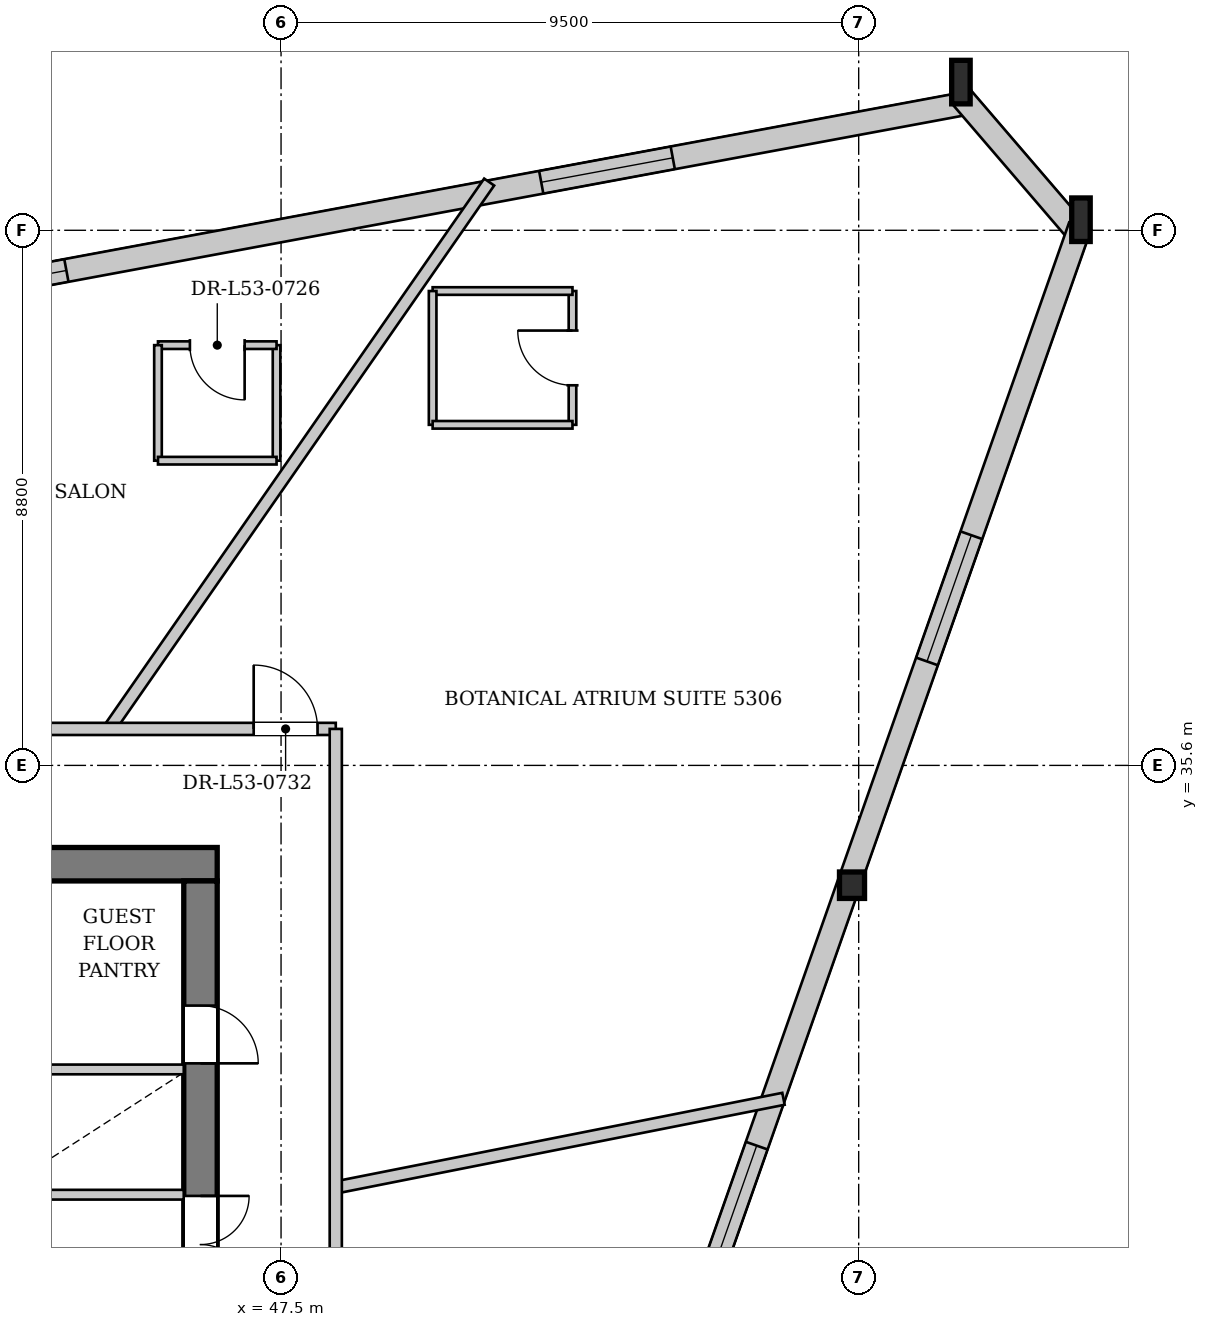
"""IFC4 building model, lengths in metres.
Left out: names, types, materials, properties, quantities, classifications, styles, units other than length and angle.
Written with IfcOpenShell. Run it as: python <this file> out.ifc"""

import sys

from ifc_helpers import new_model, si_unit, direction, frame, frame_2d, origin, origin_2d, place, context, subcontext, project, spatial, rectangle, i_section, extrude, source, transform, mapped, element, fill, save


model = new_model("IFC4")
c1 = context("Model", 3, precision=1e-05, world=origin(), true_north=direction((0.0, 1.0)))
c2 = subcontext(c1, "Body", "Model", "MODEL_VIEW")
j1 = project(units=[si_unit("LENGTHUNIT", "METRE"), si_unit("PLANEANGLEUNIT", "RADIAN")], contexts=[c1])
p1 = place(None, origin())
s1 = spatial("IfcSite", under=j1, at=p1, CompositionType="ELEMENT")
p2 = place(p1, origin())
s2 = spatial("IfcBuilding", under=s1, at=p2, CompositionType="ELEMENT")
p3 = place(p2, frame((0.0, 0.0, 200.3)))
s3 = spatial("IfcBuildingStorey", under=s2, at=p3, CompositionType="ELEMENT", Elevation=200.3)
m1 = source(origin(), c2, "Body", "SweptSolid", [
    extrude(i_section(OverallWidth=0.304, OverallDepth=0.716, WebThickness=0.021, FlangeThickness=0.04, at=origin_2d()), origin(), (0.0, 0.0, 1.0), 3.864),
])
p4 = place(p3, frame((60.82, 44.403, 0.0), z_axis=(-0.084855028505, 0.088203737746, 0.992481599217), x_axis=(-0.720654483977, -0.693294392537, 0.0)))
e1 = element("IfcColumn", 1, at=p4, inside=s3, PredefinedType="COLUMN", context=c2, shape_type="MappedRepresentation", body=[
    mapped(m1, transform((0.0, 0.0, 0.0), x_axis=(1.0, 0.0, 0.0), y_axis=(0.0, 1.0, 0.0), z_axis=(0.0, 0.0, 1.0), scale=1.0)),
])
m2 = source(origin(), c2, "Body", "SweptSolid", [
    extrude(i_section(OverallWidth=0.304, OverallDepth=0.716, WebThickness=0.021, FlangeThickness=0.04, at=origin_2d()), origin(), (0.0, 0.0, 1.0), 3.86),
])
p5 = place(p3, frame((58.851, 46.697, 0.0), z_axis=(-0.08766060525, 0.072797515616, 0.993486859504), x_axis=(-0.638873164719, -0.769312081929, 0.0)))
e2 = element("IfcColumn", 2, at=p5, inside=s3, PredefinedType="COLUMN", context=c2, shape_type="MappedRepresentation", body=[
    mapped(m2, transform((0.0, 0.0, 0.0), x_axis=(1.0, 0.0, 0.0), y_axis=(0.0, 1.0, 0.0), z_axis=(0.0, 0.0, 1.0), scale=1.0)),
])
m3 = source(origin(), c2, "Body", "SweptSolid", [
    extrude(i_section(OverallWidth=0.412, OverallDepth=0.435, WebThickness=0.031, FlangeThickness=0.05, at=origin_2d()), origin(), (0.0, 0.0, 1.0), 3.851),
])
p6 = place(p3, frame((56.977, 33.478, 0.0), z_axis=(-0.045076189594, 0.078930880513, 0.995860458716), x_axis=(-0.868371879797, -0.495913579546, 0.0)))
e3 = element("IfcColumn", 3, at=p6, inside=s3, PredefinedType="COLUMN", context=c2, shape_type="MappedRepresentation", body=[
    mapped(m3, transform((0.0, 0.0, 0.0), x_axis=(1.0, 0.0, 0.0), y_axis=(0.0, 1.0, 0.0), z_axis=(0.0, 0.0, 1.0), scale=1.0)),
])
p7 = place(p3, frame((36.667, 42.383, 0.0), z_axis=(0.0, 0.0, 1.0), x_axis=(0.983180478303, 0.182636653177, 0.0)))
e4 = element("IfcWall", 4, at=p7, inside=s3, PredefinedType="SOLIDWALL", context=c2, shape_type="SweptSolid", body=[
    extrude(rectangle(XDim=22.598, YDim=0.38, at=frame_2d((11.299, 0.0))), origin(), (0.0, 0.0, 1.0), 2.972),
])
p8 = place(p7, frame((5.227, 0.0, 0.602)))
e5 = element("IfcOpeningElement", 5, at=p8, cuts=e4, PredefinedType="OPENING", context=c2, shape_type="SweptSolid", body=[
    extrude(rectangle(XDim=2.2, YDim=2.25, at=frame_2d((1.1, 1.125))), frame((0.0, 0.2, 0.0), z_axis=(0.0, -1.0, 0.0), x_axis=(1.0, 0.0, 0.0)), (0.0, 0.0, 1.0), 0.4),
])
p9 = place(p7, frame((15.37, 0.0, 0.602)))
e6 = element("IfcOpeningElement", 6, at=p9, cuts=e4, PredefinedType="OPENING", context=c2, shape_type="SweptSolid", body=[
    extrude(rectangle(XDim=2.2, YDim=2.25, at=frame_2d((1.1, 1.125))), frame((0.0, 0.2, 0.0), z_axis=(0.0, -1.0, 0.0), x_axis=(1.0, 0.0, 0.0)), (0.0, 0.0, 1.0), 0.4),
])
p10 = place(p3, frame((58.706, 46.573, 0.0), z_axis=(0.0, 0.0, 1.0), x_axis=(0.651396453901, -0.758737543453, 0.0)))
e7 = element("IfcWall", 7, at=p10, inside=s3, PredefinedType="SOLIDWALL", context=c2, shape_type="SweptSolid", body=[
    extrude(rectangle(XDim=3.023, YDim=0.38, at=frame_2d((1.511, 0.0))), origin(), (0.0, 0.0, 1.0), 2.972),
])
p11 = place(p3, frame((60.64, 44.466, 0.0), z_axis=(0.0, 0.0, 1.0), x_axis=(-0.331792792619, -0.94335228985, 0.0)))
e8 = element("IfcWall", 8, at=p11, inside=s3, PredefinedType="SOLIDWALL", context=c2, shape_type="SweptSolid", body=[
    extrude(rectangle(XDim=23.163, YDim=0.38, at=frame_2d((11.582, 0.0))), origin(), (0.0, 0.0, 1.0), 2.972),
])
p12 = place(p11, frame((5.386, 0.0, 0.602)))
e9 = element("IfcOpeningElement", 9, at=p12, cuts=e8, PredefinedType="OPENING", context=c2, shape_type="SweptSolid", body=[
    extrude(rectangle(XDim=2.2, YDim=2.25, at=frame_2d((1.1, 1.125))), frame((0.0, 0.2, 0.0), z_axis=(0.0, -1.0, 0.0), x_axis=(1.0, 0.0, 0.0)), (0.0, 0.0, 1.0), 0.4),
])
p13 = place(p11, frame((16.027, 0.0, 0.602)))
e10 = element("IfcOpeningElement", 10, at=p13, cuts=e8, PredefinedType="OPENING", context=c2, shape_type="SweptSolid", body=[
    extrude(rectangle(XDim=2.2, YDim=2.25, at=frame_2d((1.1, 1.125))), frame((0.0, 0.2, 0.0), z_axis=(0.0, -1.0, 0.0), x_axis=(1.0, 0.0, 0.0)), (0.0, 0.0, 1.0), 0.4),
])
p14 = place(p3, frame((29.55, 33.975, 0.0), z_axis=(0.0, 0.0, 1.0), x_axis=(1.0, 0.0, 0.0)))
e11 = element("IfcWall", 11, at=p14, inside=s3, PredefinedType="SHEAR", context=c2, shape_type="SweptSolid", body=[
    extrude(rectangle(XDim=16.9, YDim=0.55, at=frame_2d((8.45, 0.0))), origin(), (0.0, 0.0, 1.0), 3.58),
])
p15 = place(p14, frame((1.55, 0.0, 0.0)))
e12 = element("IfcOpeningElement", 12, at=p15, cuts=e11, PredefinedType="OPENING", context=c2, shape_type="SweptSolid", body=[
    extrude(rectangle(XDim=0.95, YDim=2.1, at=frame_2d((0.475, 1.05))), frame((0.0, 0.285, 0.0), z_axis=(0.0, -1.0, 0.0), x_axis=(1.0, 0.0, 0.0)), (0.0, 0.0, 1.0), 0.57),
])
p16 = place(p14, frame((3.93, 0.0, 0.0)))
e13 = element("IfcOpeningElement", 13, at=p16, cuts=e11, PredefinedType="OPENING", context=c2, shape_type="SweptSolid", body=[
    extrude(rectangle(XDim=1.32, YDim=2.2, at=frame_2d((0.66, 1.1))), frame((0.0, 0.285, 0.0), z_axis=(0.0, -1.0, 0.0), x_axis=(1.0, 0.0, 0.0)), (0.0, 0.0, 1.0), 0.57),
])
p17 = place(p3, frame((46.175, 33.7, 0.0), z_axis=(0.0, 0.0, 1.0), x_axis=(0.0, -1.0, 0.0)))
e14 = element("IfcWall", 14, at=p17, inside=s3, PredefinedType="SHEAR", context=c2, shape_type="SweptSolid", body=[
    extrude(rectangle(XDim=14.2, YDim=0.55, at=frame_2d((7.1, 0.0))), origin(), (0.0, 0.0, 1.0), 3.58),
])
p18 = place(p17, frame((5.18, 0.0, 0.0)))
e15 = element("IfcOpeningElement", 15, at=p18, cuts=e14, PredefinedType="OPENING", context=c2, shape_type="SweptSolid", body=[
    extrude(rectangle(XDim=1.6, YDim=2.2, at=frame_2d((0.8, 1.1))), frame((0.0, 0.285, 0.0), z_axis=(0.0, -1.0, 0.0), x_axis=(1.0, 0.0, 0.0)), (0.0, 0.0, 1.0), 0.57),
])
p19 = place(p17, frame((2.05, 0.0, 0.0)))
e16 = element("IfcOpeningElement", 16, at=p19, cuts=e14, PredefinedType="OPENING", context=c2, shape_type="SweptSolid", body=[
    extrude(rectangle(XDim=0.95, YDim=2.1, at=frame_2d((0.475, 1.05))), frame((0.0, 0.285, 0.0), z_axis=(0.0, -1.0, 0.0), x_axis=(1.0, 0.0, 0.0)), (0.0, 0.0, 1.0), 0.57),
])
p20 = place(p3, frame((33.28, 28.54, 0.0), z_axis=(0.0, 0.0, 1.0), x_axis=(1.0, 0.0, 0.0)))
e17 = element("IfcWall", 17, at=p20, inside=s3, PredefinedType="PARTITIONING", context=c2, shape_type="SweptSolid", body=[
    extrude(rectangle(XDim=12.62, YDim=0.16, at=frame_2d((6.31, 0.0))), origin(), (0.0, 0.0, 1.0), 3.58),
])
p21 = place(p20, frame((0.26, 0.0, 0.0)))
e18 = element("IfcOpeningElement", 18, at=p21, cuts=e17, PredefinedType="OPENING", context=c2, shape_type="SweptSolid", body=[
    extrude(rectangle(XDim=1.1, YDim=2.2, at=frame_2d((0.55, 1.1))), frame((0.0, 0.09, 0.0), z_axis=(0.0, -1.0, 0.0), x_axis=(1.0, 0.0, 0.0)), (0.0, 0.0, 1.0), 0.18),
])
p22 = place(p20, frame((2.01, 0.0, 0.0)))
e19 = element("IfcOpeningElement", 19, at=p22, cuts=e17, PredefinedType="OPENING", context=c2, shape_type="SweptSolid", body=[
    extrude(rectangle(XDim=1.1, YDim=2.2, at=frame_2d((0.55, 1.1))), frame((0.0, 0.09, 0.0), z_axis=(0.0, -1.0, 0.0), x_axis=(1.0, 0.0, 0.0)), (0.0, 0.0, 1.0), 0.18),
])
p23 = place(p20, frame((3.76, 0.0, 0.0)))
e20 = element("IfcOpeningElement", 20, at=p23, cuts=e17, PredefinedType="OPENING", context=c2, shape_type="SweptSolid", body=[
    extrude(rectangle(XDim=1.1, YDim=2.2, at=frame_2d((0.55, 1.1))), frame((0.0, 0.09, 0.0), z_axis=(0.0, -1.0, 0.0), x_axis=(1.0, 0.0, 0.0)), (0.0, 0.0, 1.0), 0.18),
])
p24 = place(p3, frame((40.72, 30.6, 0.0), z_axis=(0.0, 0.0, 1.0), x_axis=(1.0, 0.0, 0.0)))
e21 = element("IfcWall", 21, at=p24, inside=s3, PredefinedType="PARTITIONING", context=c2, shape_type="SweptSolid", body=[
    extrude(rectangle(XDim=5.18, YDim=0.16, at=frame_2d((2.59, 0.0))), origin(), (0.0, 0.0, 1.0), 3.58),
])
p25 = place(p3, frame((48.4, 28.659, 0.0), z_axis=(0.0, 0.0, 1.0), x_axis=(0.980954168832, 0.19423933343, 0.0)))
e22 = element("IfcWall", 22, at=p25, inside=s3, PredefinedType="PARTITIONING", context=c2, shape_type="SweptSolid", body=[
    extrude(rectangle(XDim=7.506, YDim=0.2, at=frame_2d((3.753, 0.0))), origin(), (0.0, 0.0, 1.0), 3.58),
])
p26 = place(p3, frame((44.672, 36.2, 0.0), z_axis=(0.0, 0.0, 1.0), x_axis=(0.570707826582, 0.821153199274, 0.0)))
e23 = element("IfcWall", 23, at=p26, inside=s3, PredefinedType="PARTITIONING", context=c2, shape_type="SweptSolid", body=[
    extrude(rectangle(XDim=10.952, YDim=0.2, at=frame_2d((5.476, 0.0))), origin(), (0.0, 0.0, 1.0), 3.58),
])
p27 = place(p3, frame((52.293, 41.201, 0.0), z_axis=(0.0, 0.0, 1.0), x_axis=(0.0, 1.0, 0.0)))
e24 = element("IfcWall", 24, at=p27, inside=s3, PredefinedType="PARTITIONING", context=c2, shape_type="SweptSolid", body=[
    extrude(rectangle(XDim=2.2, YDim=0.125, at=frame_2d((1.1, 0.0))), origin(), (0.0, 0.0, 1.0), 3.58),
])
p28 = place(p27, frame((0.65, 0.0, 0.0)))
e25 = element("IfcOpeningElement", 25, at=p28, cuts=e24, PredefinedType="OPENING", context=c2, shape_type="SweptSolid", body=[
    extrude(rectangle(XDim=0.9, YDim=2.1, at=frame_2d((0.45, 1.05))), frame((0.0, 0.073, 0.0), z_axis=(0.0, -1.0, 0.0), x_axis=(1.0, 0.0, 0.0)), (0.0, 0.0, 1.0), 0.145),
])
p29 = place(p3, frame((52.293, 43.401, 0.0), z_axis=(0.0, 0.0, 1.0), x_axis=(-1.0, 0.0, 0.0)))
e26 = element("IfcWall", 26, at=p29, inside=s3, PredefinedType="PARTITIONING", context=c2, shape_type="SweptSolid", body=[
    extrude(rectangle(XDim=2.3, YDim=0.125, at=frame_2d((1.15, 0.0))), origin(), (0.0, 0.0, 1.0), 3.58),
])
p30 = place(p3, frame((49.993, 43.401, 0.0), z_axis=(0.0, 0.0, 1.0), x_axis=(0.0, -1.0, 0.0)))
e27 = element("IfcWall", 27, at=p30, inside=s3, PredefinedType="PARTITIONING", context=c2, shape_type="SweptSolid", body=[
    extrude(rectangle(XDim=2.2, YDim=0.125, at=frame_2d((1.1, 0.0))), origin(), (0.0, 0.0, 1.0), 3.58),
])
p31 = place(p3, frame((49.993, 41.201, 0.0), z_axis=(0.0, 0.0, 1.0), x_axis=(1.0, 0.0, 0.0)))
e28 = element("IfcWall", 28, at=p31, inside=s3, PredefinedType="PARTITIONING", context=c2, shape_type="SweptSolid", body=[
    extrude(rectangle(XDim=2.3, YDim=0.125, at=frame_2d((1.15, 0.0))), origin(), (0.0, 0.0, 1.0), 3.325),
])
p32 = place(p3, frame((47.426, 40.611, 0.0), z_axis=(0.0, 0.0, 1.0), x_axis=(0.0, 1.0, 0.0)))
e29 = element("IfcWall", 29, at=p32, inside=s3, PredefinedType="PARTITIONING", context=c2, shape_type="SweptSolid", body=[
    extrude(rectangle(XDim=1.9, YDim=0.125, at=frame_2d((0.95, 0.0))), origin(), (0.0, 0.0, 1.0), 3.58),
])
p33 = place(p3, frame((47.426, 42.511, 0.0), z_axis=(0.0, 0.0, 1.0), x_axis=(-1.0, 0.0, 0.0)))
e30 = element("IfcWall", 30, at=p33, inside=s3, PredefinedType="PARTITIONING", context=c2, shape_type="SweptSolid", body=[
    extrude(rectangle(XDim=1.95, YDim=0.125, at=frame_2d((0.975, 0.0))), origin(), (0.0, 0.0, 1.0), 3.58),
])
p34 = place(p33, frame((0.525, 0.0, 0.0)))
e31 = element("IfcOpeningElement", 31, at=p34, cuts=e30, PredefinedType="OPENING", context=c2, shape_type="SweptSolid", body=[
    extrude(rectangle(XDim=0.9, YDim=2.1, at=frame_2d((0.45, 1.05))), frame((0.0, 0.073, 0.0), z_axis=(0.0, -1.0, 0.0), x_axis=(1.0, 0.0, 0.0)), (0.0, 0.0, 1.0), 0.145),
])
p35 = place(p3, frame((45.476, 42.511, 0.0), z_axis=(0.0, 0.0, 1.0), x_axis=(0.0, -1.0, 0.0)))
e32 = element("IfcWall", 32, at=p35, inside=s3, PredefinedType="PARTITIONING", context=c2, shape_type="SweptSolid", body=[
    extrude(rectangle(XDim=1.9, YDim=0.125, at=frame_2d((0.95, 0.0))), origin(), (0.0, 0.0, 1.0), 3.58),
])
p36 = place(p3, frame((45.476, 40.611, 0.0), z_axis=(0.0, 0.0, 1.0), x_axis=(1.0, 0.0, 0.0)))
e33 = element("IfcWall", 33, at=p36, inside=s3, PredefinedType="PARTITIONING", context=c2, shape_type="SweptSolid", body=[
    extrude(rectangle(XDim=1.95, YDim=0.125, at=frame_2d((0.975, 0.0))), origin(), (0.0, 0.0, 1.0), 3.325),
])
p37 = place(p3, frame((43.4, 36.2, 0.0), z_axis=(0.0, 0.0, 1.0), x_axis=(1.0, 0.0, 0.0)))
e34 = element("IfcWall", 34, at=p37, inside=s3, PredefinedType="PARTITIONING", context=c2, shape_type="SweptSolid", body=[
    extrude(rectangle(XDim=5.0, YDim=0.2, at=frame_2d((2.5, 0.0))), origin(), (0.0, 0.0, 1.0), 3.58),
])
p38 = place(p37, frame((3.65, 0.0, 0.0)))
e35 = element("IfcOpeningElement", 35, at=p38, cuts=e34, PredefinedType="OPENING", context=c2, shape_type="SweptSolid", body=[
    extrude(rectangle(XDim=1.05, YDim=2.2, at=frame_2d((0.525, 1.1))), frame((0.0, 0.11, 0.0), z_axis=(0.0, -1.0, 0.0), x_axis=(1.0, 0.0, 0.0)), (0.0, 0.0, 1.0), 0.22),
])
p39 = place(p3, frame((48.4, 17.0, 0.0), z_axis=(0.0, 0.0, 1.0), x_axis=(0.0, 1.0, 0.0)))
e36 = element("IfcWall", 36, at=p39, inside=s3, PredefinedType="PARTITIONING", context=c2, shape_type="SweptSolid", body=[
    extrude(rectangle(XDim=19.2, YDim=0.2, at=frame_2d((9.6, 0.0))), origin(), (0.0, 0.0, 1.0), 3.58),
])
p40 = place(p39, frame((8.165, 0.0, 0.0)))
e37 = element("IfcOpeningElement", 37, at=p40, cuts=e36, PredefinedType="OPENING", context=c2, shape_type="SweptSolid", body=[
    extrude(rectangle(XDim=1.05, YDim=2.2, at=frame_2d((0.525, 1.1))), frame((0.0, 0.11, 0.0), z_axis=(0.0, -1.0, 0.0), x_axis=(1.0, 0.0, 0.0)), (0.0, 0.0, 1.0), 0.22),
])
m4 = source(origin(), c2, "Body", "SweptSolid", [
    extrude(rectangle(XDim=2.2, YDim=2.25, at=frame_2d((1.1, 1.125))), frame((0.0, 0.03, 0.0), z_axis=(0.0, -1.0, 0.0), x_axis=(1.0, 0.0, 0.0)), (0.0, 0.0, 1.0), 0.06),
])
p41 = place(p8, origin())
e38 = element("IfcWindow", 38, at=p41, inside=s3, PartitioningType="SINGLE_PANEL", PredefinedType="WINDOW", context=c2, shape_type="MappedRepresentation", body=[
    mapped(m4, transform((0.0, 0.0, 0.0), x_axis=(1.0, 0.0, 0.0), y_axis=(0.0, 1.0, 0.0), z_axis=(0.0, 0.0, 1.0), scale=1.0)),
])
fill(e5, e38)
p42 = place(p9, origin())
e39 = element("IfcWindow", 39, at=p42, inside=s3, PartitioningType="SINGLE_PANEL", PredefinedType="WINDOW", context=c2, shape_type="MappedRepresentation", body=[
    mapped(m4, transform((0.0, 0.0, 0.0), x_axis=(1.0, 0.0, 0.0), y_axis=(0.0, 1.0, 0.0), z_axis=(0.0, 0.0, 1.0), scale=1.0)),
])
fill(e6, e39)
p43 = place(p12, origin())
e40 = element("IfcWindow", 40, at=p43, inside=s3, PartitioningType="SINGLE_PANEL", PredefinedType="WINDOW", context=c2, shape_type="MappedRepresentation", body=[
    mapped(m4, transform((0.0, 0.0, 0.0), x_axis=(1.0, 0.0, 0.0), y_axis=(0.0, 1.0, 0.0), z_axis=(0.0, 0.0, 1.0), scale=1.0)),
])
fill(e9, e40)
p44 = place(p13, origin())
e41 = element("IfcWindow", 41, at=p44, inside=s3, PartitioningType="SINGLE_PANEL", PredefinedType="WINDOW", context=c2, shape_type="MappedRepresentation", body=[
    mapped(m4, transform((0.0, 0.0, 0.0), x_axis=(1.0, 0.0, 0.0), y_axis=(0.0, 1.0, 0.0), z_axis=(0.0, 0.0, 1.0), scale=1.0)),
])
fill(e10, e41)
m5 = source(origin(), c2, "Body", "SweptSolid", [
    extrude(rectangle(XDim=1.6, YDim=2.2, at=frame_2d((0.8, 1.1))), frame((0.0, 0.025, 0.0), z_axis=(0.0, -1.0, 0.0), x_axis=(1.0, 0.0, 0.0)), (0.0, 0.0, 1.0), 0.05),
])
p45 = place(p18, origin())
e42 = element("IfcDoor", 42, at=p45, inside=s3, OperationType="DOUBLE_DOOR_SINGLE_SWING", PredefinedType="DOOR", context=c2, shape_type="MappedRepresentation", body=[
    mapped(m5, transform((0.0, 0.0, 0.0), x_axis=(1.0, 0.0, 0.0), y_axis=(0.0, 1.0, 0.0), z_axis=(0.0, 0.0, 1.0), scale=1.0)),
])
fill(e15, e42)
m6 = source(origin(), c2, "Body", "SweptSolid", [
    extrude(rectangle(XDim=0.95, YDim=2.1, at=frame_2d((0.475, 1.05))), frame((0.0, 0.025, 0.0), z_axis=(0.0, -1.0, 0.0), x_axis=(1.0, 0.0, 0.0)), (0.0, 0.0, 1.0), 0.05),
])
p46 = place(p19, origin())
e43 = element("IfcDoor", 43, at=p46, inside=s3, OperationType="SINGLE_SWING_RIGHT", PredefinedType="DOOR", context=c2, shape_type="MappedRepresentation", body=[
    mapped(m6, transform((0.0, 0.0, 0.0), x_axis=(1.0, 0.0, 0.0), y_axis=(0.0, 1.0, 0.0), z_axis=(0.0, 0.0, 1.0), scale=1.0)),
])
fill(e16, e43)
m7 = source(origin(), c2, "Body", "SweptSolid", [
    extrude(rectangle(XDim=0.9, YDim=2.1, at=frame_2d((0.45, 1.05))), frame((0.0, 0.025, 0.0), z_axis=(0.0, -1.0, 0.0), x_axis=(1.0, 0.0, 0.0)), (0.0, 0.0, 1.0), 0.05),
])
p47 = place(p28, origin())
e44 = element("IfcDoor", 44, at=p47, inside=s3, OperationType="SINGLE_SWING_RIGHT", PredefinedType="DOOR", context=c2, shape_type="MappedRepresentation", body=[
    mapped(m7, transform((0.0, 0.0, 0.0), x_axis=(1.0, 0.0, 0.0), y_axis=(0.0, 1.0, 0.0), z_axis=(0.0, 0.0, 1.0), scale=1.0)),
])
fill(e25, e44)
p48 = place(p34, origin())
e45 = element("IfcDoor", 45, at=p48, inside=s3, OperationType="SINGLE_SWING_LEFT", PredefinedType="DOOR", context=c2, shape_type="MappedRepresentation", body=[
    mapped(m7, transform((0.0, 0.0, 0.0), x_axis=(1.0, 0.0, 0.0), y_axis=(0.0, 1.0, 0.0), z_axis=(0.0, 0.0, 1.0), scale=1.0)),
])
fill(e31, e45)
m8 = source(origin(), c2, "Body", "SweptSolid", [
    extrude(rectangle(XDim=1.05, YDim=2.2, at=frame_2d((0.525, 1.1))), frame((0.0, 0.025, 0.0), z_axis=(0.0, -1.0, 0.0), x_axis=(1.0, 0.0, 0.0)), (0.0, 0.0, 1.0), 0.05),
])
p49 = place(p38, origin())
e46 = element("IfcDoor", 46, at=p49, inside=s3, OperationType="SINGLE_SWING_LEFT", PredefinedType="DOOR", context=c2, shape_type="MappedRepresentation", body=[
    mapped(m8, transform((0.0, 0.0, 0.0), x_axis=(1.0, 0.0, 0.0), y_axis=(0.0, 1.0, 0.0), z_axis=(0.0, 0.0, 1.0), scale=1.0)),
])
fill(e35, e46)
save(model, sys.argv[1])
